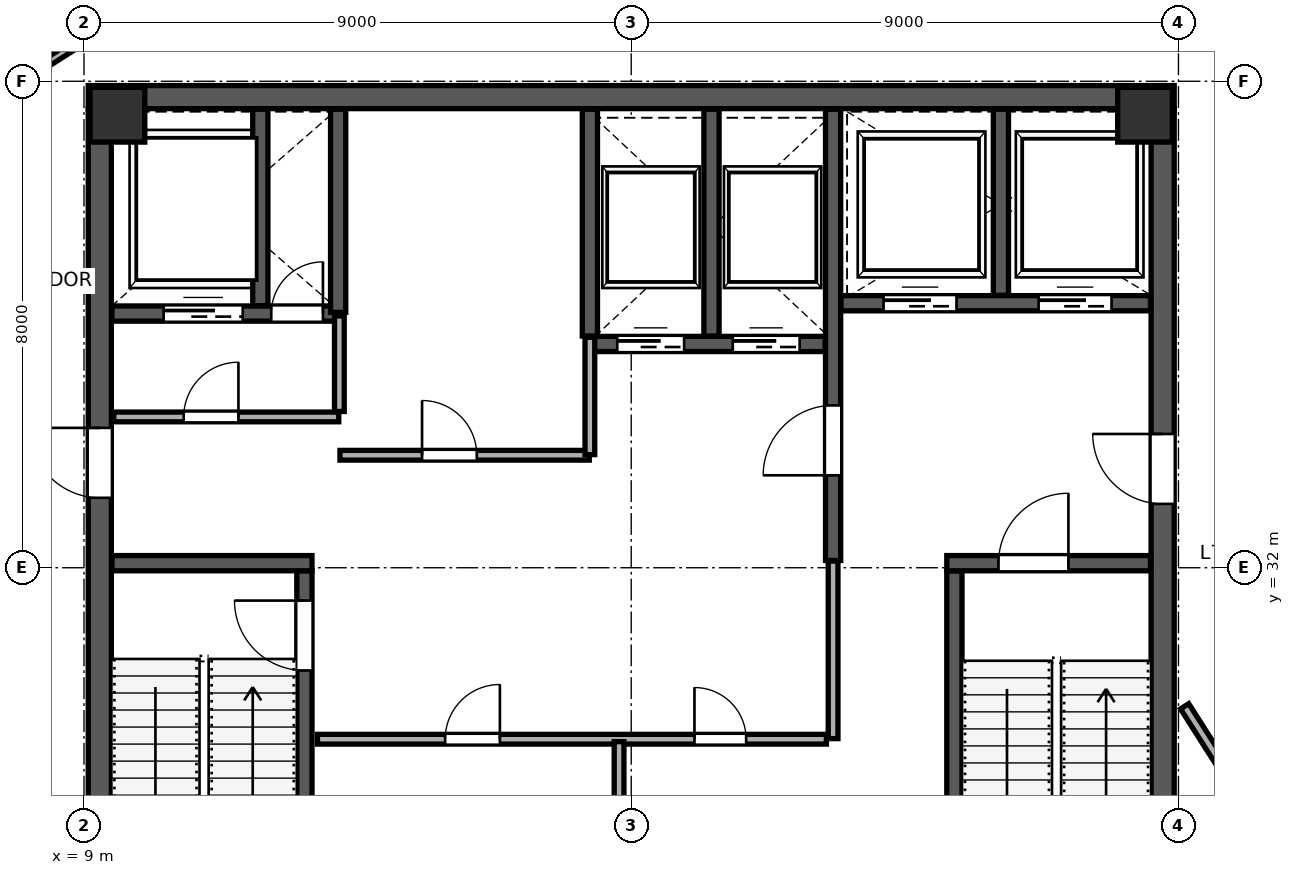
"""IFC4 building model, lengths in metres.
Left out: names, types, materials, properties, quantities, classifications, styles, units other than length and angle.
Written with IfcOpenShell. Run it as: python <this file> out.ifc"""

import sys

from ifc_helpers import new_model, si_unit, direction, frame, frame_2d, origin, origin_2d, place, context, subcontext, project, spatial, rectangle, extrude, source, transform, mapped, element, fill, save


model = new_model("IFC4")
c1 = context("Model", 3, precision=1e-05, world=origin(), true_north=direction((0.0, 1.0)))
c2 = subcontext(c1, "Body", "Model", "MODEL_VIEW")
j1 = project(units=[si_unit("LENGTHUNIT", "METRE"), si_unit("PLANEANGLEUNIT", "RADIAN")], contexts=[c1])
p1 = place(None, origin())
s1 = spatial("IfcSite", under=j1, at=p1, CompositionType="ELEMENT")
p2 = place(p1, origin())
s2 = spatial("IfcBuilding", under=s1, at=p2, CompositionType="ELEMENT")
p3 = place(p2, frame((0.0, 0.0, 311.4)))
s3 = spatial("IfcBuildingStorey", under=s2, at=p3, CompositionType="ELEMENT", Elevation=311.4)
m1 = source(origin(), c2, "Body", "SweptSolid", [
    extrude(rectangle(XDim=0.9, YDim=0.9, at=origin_2d()), origin(), (0.0, 0.0, 1.0), 4.199),
])
for number, where, z_axis, x_axis in (
    (1, (9.55, 39.45, 0.001), (0.0, 0.0, 1.0), (1.0, 0.0, 0.0)),
    (2, (26.45, 39.45, 0.001), (0.0, 0.0, 1.0), (1.0, 0.0, 0.0)),
):
    element("IfcColumn", number, at=place(p3, frame(where, z_axis=z_axis, x_axis=x_axis)), inside=s3, PredefinedType="COLUMN", context=c2, shape_type="MappedRepresentation", body=[
        mapped(m1, transform((0.0, 0.0, 0.0), scale=1.0)),
    ])
p4 = place(p3, frame((9.26, 24.45, 0.0), z_axis=(0.0, 0.0, 1.0), x_axis=(0.0, 1.0, 0.0)))
e3 = element("IfcWall", 3, at=p4, inside=s3, PredefinedType="SHEAR", context=c2, shape_type="SweptSolid", body=[
    extrude(rectangle(XDim=15.1, YDim=0.38, at=frame_2d((7.55, 0.0))), origin(), (0.0, 0.0, 1.0), 3.96),
])
p5 = place(p4, frame((8.7, 0.0, 0.0)))
e4 = element("IfcOpeningElement", 4, at=p5, cuts=e3, PredefinedType="OPENING", context=c2, shape_type="SweptSolid", body=[
    extrude(rectangle(XDim=1.15, YDim=2.2, at=frame_2d((0.575, 1.1))), frame((0.0, 0.2, 0.0), z_axis=(0.0, -1.0, 0.0), x_axis=(1.0, 0.0, 0.0)), (0.0, 0.0, 1.0), 0.4),
])
p6 = place(p3, frame((26.74, 24.45, 0.0), z_axis=(0.0, 0.0, 1.0), x_axis=(0.0, 1.0, 0.0)))
e5 = element("IfcWall", 5, at=p6, inside=s3, PredefinedType="SHEAR", context=c2, shape_type="SweptSolid", body=[
    extrude(rectangle(XDim=15.1, YDim=0.38, at=frame_2d((7.55, 0.0))), origin(), (0.0, 0.0, 1.0), 3.96),
])
p7 = place(p6, frame((8.6, 0.0, 0.0)))
e6 = element("IfcOpeningElement", 6, at=p7, cuts=e5, PredefinedType="OPENING", context=c2, shape_type="SweptSolid", body=[
    extrude(rectangle(XDim=1.15, YDim=2.2, at=frame_2d((0.575, 1.1))), frame((0.0, 0.2, 0.0), z_axis=(0.0, -1.0, 0.0), x_axis=(1.0, 0.0, 0.0)), (0.0, 0.0, 1.0), 0.4),
])
p8 = place(p3, frame((9.07, 39.74, 0.0), z_axis=(0.0, 0.0, 1.0), x_axis=(1.0, 0.0, 0.0)))
e7 = element("IfcWall", 7, at=p8, inside=s3, PredefinedType="SHEAR", context=c2, shape_type="SweptSolid", body=[
    extrude(rectangle(XDim=17.86, YDim=0.38, at=frame_2d((8.93, 0.0))), origin(), (0.0, 0.0, 1.0), 3.96),
])
p9 = place(p3, frame((12.625, 24.46, 0.0), z_axis=(0.0, 0.0, 1.0), x_axis=(0.0, 1.0, 0.0)))
e8 = element("IfcWall", 8, at=p9, inside=s3, PredefinedType="SHEAR", context=c2, shape_type="SweptSolid", body=[
    extrude(rectangle(XDim=7.49, YDim=0.25, at=frame_2d((3.745, 0.0))), origin(), (0.0, 0.0, 1.0), 3.96),
])
p10 = place(p9, frame((5.85, 0.0, 0.0)))
e9 = element("IfcOpeningElement", 9, at=p10, cuts=e8, PredefinedType="OPENING", context=c2, shape_type="SweptSolid", body=[
    extrude(rectangle(XDim=1.15, YDim=2.2, at=frame_2d((0.575, 1.1))), frame((0.0, 0.135, 0.0), z_axis=(0.0, -1.0, 0.0), x_axis=(1.0, 0.0, 0.0)), (0.0, 0.0, 1.0), 0.27),
])
p11 = place(p3, frame((9.46, 32.075, 0.0), z_axis=(0.0, 0.0, 1.0), x_axis=(1.0, 0.0, 0.0)))
e10 = element("IfcWall", 10, at=p11, inside=s3, PredefinedType="SHEAR", context=c2, shape_type="SweptSolid", body=[
    extrude(rectangle(XDim=3.29, YDim=0.25, at=frame_2d((1.645, 0.0))), origin(), (0.0, 0.0, 1.0), 3.96),
])
p12 = place(p3, frame((23.315, 24.46, 0.0), z_axis=(0.0, 0.0, 1.0), x_axis=(0.0, 1.0, 0.0)))
e11 = element("IfcWall", 11, at=p12, inside=s3, PredefinedType="SHEAR", context=c2, shape_type="SweptSolid", body=[
    extrude(rectangle(XDim=7.49, YDim=0.25, at=frame_2d((3.745, 0.0))), origin(), (0.0, 0.0, 1.0), 3.96),
])
p13 = place(p3, frame((23.19, 32.075, 0.0), z_axis=(0.0, 0.0, 1.0), x_axis=(1.0, 0.0, 0.0)))
e12 = element("IfcWall", 12, at=p13, inside=s3, PredefinedType="SHEAR", context=c2, shape_type="SweptSolid", body=[
    extrude(rectangle(XDim=3.35, YDim=0.25, at=frame_2d((1.675, 0.0))), origin(), (0.0, 0.0, 1.0), 3.96),
])
p14 = place(p13, frame((0.85, 0.0, 0.0)))
e13 = element("IfcOpeningElement", 13, at=p14, cuts=e12, PredefinedType="OPENING", context=c2, shape_type="SweptSolid", body=[
    extrude(rectangle(XDim=1.15, YDim=2.2, at=frame_2d((0.575, 1.1))), frame((0.0, 0.135, 0.0), z_axis=(0.0, -1.0, 0.0), x_axis=(1.0, 0.0, 0.0)), (0.0, 0.0, 1.0), 0.27),
])
p15 = place(p3, frame((21.32, 32.12, 0.0), z_axis=(0.0, 0.0, 1.0), x_axis=(0.0, 1.0, 0.0)))
e14 = element("IfcWall", 14, at=p15, inside=s3, PredefinedType="SHEAR", context=c2, shape_type="SweptSolid", body=[
    extrude(rectangle(XDim=7.42, YDim=0.25, at=frame_2d((3.71, 0.0))), origin(), (0.0, 0.0, 1.0), 3.96),
])
p16 = place(p15, frame((1.4, 0.0, 0.0)))
e15 = element("IfcOpeningElement", 15, at=p16, cuts=e14, PredefinedType="OPENING", context=c2, shape_type="SweptSolid", body=[
    extrude(rectangle(XDim=1.15, YDim=2.2, at=frame_2d((0.575, 1.1))), frame((0.0, 0.135, 0.0), z_axis=(0.0, -1.0, 0.0), x_axis=(1.0, 0.0, 0.0)), (0.0, 0.0, 1.0), 0.27),
])
p17 = place(p3, frame((9.46, 36.18, 0.0), z_axis=(0.0, 0.0, 1.0), x_axis=(1.0, 0.0, 0.0)))
e16 = element("IfcWall", 16, at=p17, inside=s3, PredefinedType="SHEAR", context=c2, shape_type="SweptSolid", body=[
    extrude(rectangle(XDim=3.79, YDim=0.25, at=frame_2d((1.895, 0.0))), origin(), (0.0, 0.0, 1.0), 3.96),
])
p18 = place(p17, frame((2.62, 0.0, 0.0)))
e17 = element("IfcOpeningElement", 17, at=p18, cuts=e16, PredefinedType="OPENING", context=c2, shape_type="SweptSolid", body=[
    extrude(rectangle(XDim=0.85, YDim=2.1, at=frame_2d((0.425, 1.05))), frame((0.0, 0.135, 0.0), z_axis=(0.0, -1.0, 0.0), x_axis=(1.0, 0.0, 0.0)), (0.0, 0.0, 1.0), 0.27),
])
p19 = place(p17, frame((0.85, 0.0, 0.0)))
e18 = element("IfcOpeningElement", 18, at=p19, cuts=e16, PredefinedType="OPENING", context=c2, shape_type="SweptSolid", body=[
    extrude(rectangle(XDim=1.3, YDim=2.25, at=frame_2d((0.65, 1.125))), frame((0.0, 0.135, 0.0), z_axis=(0.0, -1.0, 0.0), x_axis=(1.0, 0.0, 0.0)), (0.0, 0.0, 1.0), 0.27),
])
p20 = place(p3, frame((11.9, 36.31, 0.0), z_axis=(0.0, 0.0, 1.0), x_axis=(0.0, 1.0, 0.0)))
e19 = element("IfcWall", 19, at=p20, inside=s3, PredefinedType="SHEAR", context=c2, shape_type="SweptSolid", body=[
    extrude(rectangle(XDim=3.23, YDim=0.25, at=frame_2d((1.615, 0.0))), origin(), (0.0, 0.0, 1.0), 3.96),
])
p21 = place(p3, frame((21.45, 36.35, 0.0), z_axis=(0.0, 0.0, 1.0), x_axis=(1.0, 0.0, 0.0)))
e20 = element("IfcWall", 20, at=p21, inside=s3, PredefinedType="SHEAR", context=c2, shape_type="SweptSolid", body=[
    extrude(rectangle(XDim=5.09, YDim=0.25, at=frame_2d((2.545, 0.0))), origin(), (0.0, 0.0, 1.0), 3.96),
])
p22 = place(p21, frame((0.7, 0.0, 0.0)))
e21 = element("IfcOpeningElement", 21, at=p22, cuts=e20, PredefinedType="OPENING", context=c2, shape_type="SweptSolid", body=[
    extrude(rectangle(XDim=1.2, YDim=2.2, at=frame_2d((0.6, 1.1))), frame((0.0, 0.135, 0.0), z_axis=(0.0, -1.0, 0.0), x_axis=(1.0, 0.0, 0.0)), (0.0, 0.0, 1.0), 0.27),
])
p23 = place(p21, frame((3.25, 0.0, 0.0)))
e22 = element("IfcOpeningElement", 22, at=p23, cuts=e20, PredefinedType="OPENING", context=c2, shape_type="SweptSolid", body=[
    extrude(rectangle(XDim=1.2, YDim=2.2, at=frame_2d((0.6, 1.1))), frame((0.0, 0.135, 0.0), z_axis=(0.0, -1.0, 0.0), x_axis=(1.0, 0.0, 0.0)), (0.0, 0.0, 1.0), 0.27),
])
p24 = place(p3, frame((24.08, 36.48, 0.0), z_axis=(0.0, 0.0, 1.0), x_axis=(0.0, 1.0, 0.0)))
e23 = element("IfcWall", 23, at=p24, inside=s3, PredefinedType="SHEAR", context=c2, shape_type="SweptSolid", body=[
    extrude(rectangle(XDim=3.06, YDim=0.25, at=frame_2d((1.53, 0.0))), origin(), (0.0, 0.0, 1.0), 3.96),
])
p25 = place(p3, frame((13.18, 36.2, 0.0), z_axis=(0.0, 0.0, 1.0), x_axis=(0.0, 1.0, 0.0)))
e24 = element("IfcWall", 24, at=p25, inside=s3, PredefinedType="SHEAR", context=c2, shape_type="SweptSolid", body=[
    extrude(rectangle(XDim=3.34, YDim=0.25, at=frame_2d((1.67, 0.0))), origin(), (0.0, 0.0, 1.0), 3.96),
])
p26 = place(p3, frame((17.32, 35.68, 0.0), z_axis=(0.0, 0.0, 1.0), x_axis=(1.0, 0.0, 0.0)))
e25 = element("IfcWall", 25, at=p26, inside=s3, PredefinedType="SHEAR", context=c2, shape_type="SweptSolid", body=[
    extrude(rectangle(XDim=3.87, YDim=0.25, at=frame_2d((1.935, 0.0))), origin(), (0.0, 0.0, 1.0), 3.96),
])
p27 = place(p26, frame((0.45, 0.0, 0.0)))
e26 = element("IfcOpeningElement", 26, at=p27, cuts=e25, PredefinedType="OPENING", context=c2, shape_type="SweptSolid", body=[
    extrude(rectangle(XDim=1.1, YDim=2.2, at=frame_2d((0.55, 1.1))), frame((0.0, 0.135, 0.0), z_axis=(0.0, -1.0, 0.0), x_axis=(1.0, 0.0, 0.0)), (0.0, 0.0, 1.0), 0.27),
])
p28 = place(p26, frame((2.35, 0.0, 0.0)))
e27 = element("IfcOpeningElement", 27, at=p28, cuts=e25, PredefinedType="OPENING", context=c2, shape_type="SweptSolid", body=[
    extrude(rectangle(XDim=1.1, YDim=2.2, at=frame_2d((0.55, 1.1))), frame((0.0, 0.135, 0.0), z_axis=(0.0, -1.0, 0.0), x_axis=(1.0, 0.0, 0.0)), (0.0, 0.0, 1.0), 0.27),
])
for number, where, z_axis, x_axis in (
    (28, (17.32, 35.81, 0.0), (0.0, 0.0, 1.0), (0.0, 1.0, 0.0)),
    (29, (19.32, 35.81, 0.0), (0.0, 0.0, 1.0), (0.0, 1.0, 0.0)),
):
    element("IfcWall", number, at=place(p3, frame(where, z_axis=z_axis, x_axis=x_axis)), inside=s3, PredefinedType="SHEAR", context=c2, shape_type="SweptSolid", body=[
        extrude(rectangle(XDim=3.73, YDim=0.25, at=frame_2d((1.865, 0.0))), origin(), (0.0, 0.0, 1.0), 3.96),
    ])
p29 = place(p3, frame((9.49, 34.48, 0.0), z_axis=(0.0, 0.0, 1.0), x_axis=(1.0, 0.0, 0.0)))
e30 = element("IfcWall", 30, at=p29, inside=s3, PredefinedType="PARTITIONING", context=c2, shape_type="SweptSolid", body=[
    extrude(rectangle(XDim=3.7, YDim=0.16, at=frame_2d((1.85, 0.0))), origin(), (0.0, 0.0, 1.0), 3.96),
])
p30 = place(p29, frame((1.15, 0.0, 0.0)))
e31 = element("IfcOpeningElement", 31, at=p30, cuts=e30, PredefinedType="OPENING", context=c2, shape_type="SweptSolid", body=[
    extrude(rectangle(XDim=0.9, YDim=2.15, at=frame_2d((0.45, 1.075))), frame((0.0, 0.09, 0.0), z_axis=(0.0, -1.0, 0.0), x_axis=(1.0, 0.0, 0.0)), (0.0, 0.0, 1.0), 0.18),
])
p31 = place(p3, frame((13.2, 34.57, 0.0), z_axis=(0.0, 0.0, 1.0), x_axis=(0.0, 1.0, 0.0)))
e32 = element("IfcWall", 32, at=p31, inside=s3, PredefinedType="PARTITIONING", context=c2, shape_type="SweptSolid", body=[
    extrude(rectangle(XDim=1.57, YDim=0.16, at=frame_2d((0.785, 0.0))), origin(), (0.0, 0.0, 1.0), 3.96),
])
p32 = place(p3, frame((13.21, 33.85, 0.0), z_axis=(0.0, 0.0, 1.0), x_axis=(1.0, 0.0, 0.0)))
e33 = element("IfcWall", 33, at=p32, inside=s3, PredefinedType="PARTITIONING", context=c2, shape_type="SweptSolid", body=[
    extrude(rectangle(XDim=4.1, YDim=0.16, at=frame_2d((2.05, 0.0))), origin(), (0.0, 0.0, 1.0), 3.96),
])
p33 = place(p32, frame((1.35, 0.0, 0.0)))
e34 = element("IfcOpeningElement", 34, at=p33, cuts=e33, PredefinedType="OPENING", context=c2, shape_type="SweptSolid", body=[
    extrude(rectangle(XDim=0.9, YDim=2.15, at=frame_2d((0.45, 1.075))), frame((0.0, 0.09, 0.0), z_axis=(0.0, -1.0, 0.0), x_axis=(1.0, 0.0, 0.0)), (0.0, 0.0, 1.0), 0.18),
])
p34 = place(p3, frame((17.32, 33.86, 0.0), z_axis=(0.0, 0.0, 1.0), x_axis=(0.0, 1.0, 0.0)))
e35 = element("IfcWall", 35, at=p34, inside=s3, PredefinedType="PARTITIONING", context=c2, shape_type="SweptSolid", body=[
    extrude(rectangle(XDim=1.93, YDim=0.16, at=frame_2d((0.965, 0.0))), origin(), (0.0, 0.0, 1.0), 3.96),
])
p35 = place(p3, frame((12.84, 29.18, 0.0), z_axis=(0.0, 0.0, 1.0), x_axis=(1.0, 0.0, 0.0)))
e36 = element("IfcWall", 36, at=p35, inside=s3, PredefinedType="PARTITIONING", context=c2, shape_type="SweptSolid", body=[
    extrude(rectangle(XDim=8.37, YDim=0.16, at=frame_2d((4.185, 0.0))), origin(), (0.0, 0.0, 1.0), 3.96),
])
p36 = place(p35, frame((2.1, 0.0, 0.0)))
e37 = element("IfcOpeningElement", 37, at=p36, cuts=e36, PredefinedType="OPENING", context=c2, shape_type="SweptSolid", body=[
    extrude(rectangle(XDim=0.9, YDim=2.15, at=frame_2d((0.45, 1.075))), frame((0.0, 0.09, 0.0), z_axis=(0.0, -1.0, 0.0), x_axis=(1.0, 0.0, 0.0)), (0.0, 0.0, 1.0), 0.18),
])
p37 = place(p35, frame((6.2, 0.0, 0.0)))
e38 = element("IfcOpeningElement", 38, at=p37, cuts=e36, PredefinedType="OPENING", context=c2, shape_type="SweptSolid", body=[
    extrude(rectangle(XDim=0.85, YDim=2.1, at=frame_2d((0.425, 1.05))), frame((0.0, 0.09, 0.0), z_axis=(0.0, -1.0, 0.0), x_axis=(1.0, 0.0, 0.0)), (0.0, 0.0, 1.0), 0.18),
])
p38 = place(p3, frame((17.8, 24.54, 0.0), z_axis=(0.0, 0.0, 1.0), x_axis=(0.0, 1.0, 0.0)))
e39 = element("IfcWall", 39, at=p38, inside=s3, PredefinedType="PARTITIONING", context=c2, shape_type="SweptSolid", body=[
    extrude(rectangle(XDim=4.6, YDim=0.16, at=frame_2d((2.3, 0.0))), origin(), (0.0, 0.0, 1.0), 3.96),
])
p39 = place(p3, frame((21.32, 29.19, 0.0), z_axis=(0.0, 0.0, 1.0), x_axis=(0.0, 1.0, 0.0)))
e40 = element("IfcWall", 40, at=p39, inside=s3, PredefinedType="PARTITIONING", context=c2, shape_type="SweptSolid", body=[
    extrude(rectangle(XDim=2.92, YDim=0.16, at=frame_2d((1.46, 0.0))), origin(), (0.0, 0.0, 1.0), 3.96),
])
p40 = place(p3, frame((3.26, 30.945, 0.0), z_axis=(0.0, 0.0, 1.0), x_axis=(0.537307625317, -0.843386338386, 0.0)))
e41 = element("IfcWall", 41, at=p40, inside=s3, PredefinedType="PARTITIONING", context=c2, shape_type="SweptSolid", body=[
    extrude(rectangle(XDim=13.67, YDim=0.16, at=frame_2d((6.835, 0.0))), origin(), (0.0, 0.0, 1.0), 3.96),
])
p41 = place(p40, frame((1.15, 0.0, 0.0)))
e42 = element("IfcOpeningElement", 42, at=p41, cuts=e41, PredefinedType="OPENING", context=c2, shape_type="SweptSolid", body=[
    extrude(rectangle(XDim=0.95, YDim=2.15, at=frame_2d((0.475, 1.075))), frame((0.0, 0.09, 0.0), z_axis=(0.0, -1.0, 0.0), x_axis=(1.0, 0.0, 0.0)), (0.0, 0.0, 1.0), 0.18),
])
p42 = place(p3, frame((27.102, 29.721, 0.0), z_axis=(0.0, 0.0, 1.0), x_axis=(0.537279676557, -0.843404143432, 0.0)))
e43 = element("IfcWall", 43, at=p42, inside=s3, PredefinedType="PARTITIONING", context=c2, shape_type="SweptSolid", body=[
    extrude(rectangle(XDim=1.329, YDim=0.16, at=frame_2d((0.664, 0.0))), origin(), (0.0, 0.0, 1.0), 3.96),
])
p43 = place(p3, frame((22.509, 49.847, 0.0), z_axis=(0.0, 0.0, 1.0), x_axis=(0.537290700932, -0.843397120396, 0.0)))
e44 = element("IfcWall", 44, at=p43, inside=s3, PredefinedType="PARTITIONING", context=c2, shape_type="SweptSolid", body=[
    extrude(rectangle(XDim=20.77, YDim=0.135, at=frame_2d((10.385, 0.0))), origin(), (0.0, 0.0, 1.0), 3.96),
])
p44 = place(p43, frame((4.3, 0.0, 0.0)))
e45 = element("IfcOpeningElement", 45, at=p44, cuts=e44, PredefinedType="OPENING", context=c2, shape_type="SweptSolid", body=[
    extrude(rectangle(XDim=0.95, YDim=2.15, at=frame_2d((0.475, 1.075))), frame((0.0, 0.078, 0.0), z_axis=(0.0, -1.0, 0.0), x_axis=(1.0, 0.0, 0.0)), (0.0, 0.0, 1.0), 0.155),
])
p45 = place(p3, frame((1.798, 36.107, 0.0), z_axis=(0.0, 0.0, 1.0), x_axis=(0.843396745572, 0.537291289301, 0.0)))
e46 = element("IfcWall", 46, at=p45, inside=s3, PredefinedType="PARTITIONING", context=c2, shape_type="SweptSolid", body=[
    extrude(rectangle(XDim=17.17, YDim=0.135, at=frame_2d((8.585, 0.0))), origin(), (0.0, 0.0, 1.0), 3.96),
])
m2 = source(origin(), c2, "Body", "SweptSolid", [
    extrude(rectangle(XDim=1.15, YDim=2.2, at=frame_2d((0.575, 1.1))), frame((0.0, 0.025, 0.0), z_axis=(0.0, -1.0, 0.0), x_axis=(1.0, 0.0, 0.0)), (0.0, 0.0, 1.0), 0.05),
])
p46 = place(p10, origin())
e47 = element("IfcDoor", 47, at=p46, inside=s3, OperationType="SINGLE_SWING_RIGHT", PredefinedType="DOOR", context=c2, shape_type="MappedRepresentation", body=[
    mapped(m2, transform((0.0, 0.0, 0.0), scale=1.0)),
])
fill(e9, e47)
m3 = source(origin(), c2, "Body", "SweptSolid", [
    extrude(rectangle(XDim=1.15, YDim=2.2, at=frame_2d((0.575, 1.1))), frame((0.0, 0.025, 0.0), z_axis=(0.0, -1.0, 0.0), x_axis=(1.0, 0.0, 0.0)), (0.0, 0.0, 1.0), 0.05),
])
p47 = place(p16, origin())
e48 = element("IfcDoor", 48, at=p47, inside=s3, OperationType="SINGLE_SWING_LEFT", PredefinedType="DOOR", context=c2, shape_type="MappedRepresentation", body=[
    mapped(m3, transform((0.0, 0.0, 0.0), scale=1.0)),
])
fill(e15, e48)
p48 = place(p14, origin())
e49 = element("IfcDoor", 49, at=p48, inside=s3, OperationType="SINGLE_SWING_RIGHT", PredefinedType="DOOR", context=c2, shape_type="MappedRepresentation", body=[
    mapped(m2, transform((0.0, 0.0, 0.0), scale=1.0)),
])
fill(e13, e49)
p49 = place(p7, origin())
e50 = element("IfcDoor", 50, at=p49, inside=s3, OperationType="SINGLE_SWING_RIGHT", PredefinedType="DOOR", context=c2, shape_type="MappedRepresentation", body=[
    mapped(m3, transform((0.0, 0.0, 0.0), scale=1.0)),
])
fill(e6, e50)
p50 = place(p5, origin())
e51 = element("IfcDoor", 51, at=p50, inside=s3, OperationType="SINGLE_SWING_RIGHT", PredefinedType="DOOR", context=c2, shape_type="MappedRepresentation", body=[
    mapped(m3, transform((0.0, 0.0, 0.0), scale=1.0)),
])
fill(e4, e51)
m4 = source(origin(), c2, "Body", "SweptSolid", [
    extrude(rectangle(XDim=0.85, YDim=2.1, at=frame_2d((0.425, 1.05))), frame((0.0, 0.025, 0.0), z_axis=(0.0, -1.0, 0.0), x_axis=(1.0, 0.0, 0.0)), (0.0, 0.0, 1.0), 0.05),
])
p51 = place(p18, origin())
e52 = element("IfcDoor", 52, at=p51, inside=s3, OperationType="SINGLE_SWING_RIGHT", PredefinedType="DOOR", context=c2, shape_type="MappedRepresentation", body=[
    mapped(m4, transform((0.0, 0.0, 0.0), scale=1.0)),
])
fill(e17, e52)
m5 = source(origin(), c2, "Body", "SweptSolid", [
    extrude(rectangle(XDim=1.1, YDim=2.2, at=frame_2d((0.55, 1.1))), frame((0.0, 0.025, 0.0), z_axis=(0.0, -1.0, 0.0), x_axis=(1.0, 0.0, 0.0)), (0.0, 0.0, 1.0), 0.05),
])
p52 = place(p27, origin())
e53 = element("IfcDoor", 53, at=p52, inside=s3, OperationType="SLIDING_TO_LEFT", PredefinedType="DOOR", context=c2, shape_type="MappedRepresentation", body=[
    mapped(m5, transform((0.0, 0.0, 0.0), scale=1.0)),
])
fill(e26, e53)
p53 = place(p28, origin())
e54 = element("IfcDoor", 54, at=p53, inside=s3, OperationType="SLIDING_TO_RIGHT", PredefinedType="DOOR", context=c2, shape_type="MappedRepresentation", body=[
    mapped(m5, transform((0.0, 0.0, 0.0), scale=1.0)),
])
fill(e27, e54)
m6 = source(origin(), c2, "Body", "SweptSolid", [
    extrude(rectangle(XDim=1.2, YDim=2.2, at=frame_2d((0.6, 1.1))), frame((0.0, 0.025, 0.0), z_axis=(0.0, -1.0, 0.0), x_axis=(1.0, 0.0, 0.0)), (0.0, 0.0, 1.0), 0.05),
])
p54 = place(p22, origin())
e55 = element("IfcDoor", 55, at=p54, inside=s3, OperationType="SLIDING_TO_LEFT", PredefinedType="DOOR", context=c2, shape_type="MappedRepresentation", body=[
    mapped(m6, transform((0.0, 0.0, 0.0), scale=1.0)),
])
fill(e21, e55)
p55 = place(p23, origin())
e56 = element("IfcDoor", 56, at=p55, inside=s3, OperationType="SLIDING_TO_RIGHT", PredefinedType="DOOR", context=c2, shape_type="MappedRepresentation", body=[
    mapped(m6, transform((0.0, 0.0, 0.0), scale=1.0)),
])
fill(e22, e56)
m7 = source(origin(), c2, "Body", "SweptSolid", [
    extrude(rectangle(XDim=1.3, YDim=2.25, at=frame_2d((0.65, 1.125))), frame((0.0, 0.025, 0.0), z_axis=(0.0, -1.0, 0.0), x_axis=(1.0, 0.0, 0.0)), (0.0, 0.0, 1.0), 0.05),
])
p56 = place(p19, origin())
e57 = element("IfcDoor", 57, at=p56, inside=s3, OperationType="SLIDING_TO_LEFT", PredefinedType="DOOR", context=c2, shape_type="MappedRepresentation", body=[
    mapped(m7, transform((0.0, 0.0, 0.0), scale=1.0)),
])
fill(e18, e57)
m8 = source(origin(), c2, "Body", "SweptSolid", [
    extrude(rectangle(XDim=0.9, YDim=2.15, at=frame_2d((0.45, 1.075))), frame((0.0, 0.025, 0.0), z_axis=(0.0, -1.0, 0.0), x_axis=(1.0, 0.0, 0.0)), (0.0, 0.0, 1.0), 0.05),
])
p57 = place(p30, origin())
e58 = element("IfcDoor", 58, at=p57, inside=s3, OperationType="SINGLE_SWING_RIGHT", PredefinedType="DOOR", context=c2, shape_type="MappedRepresentation", body=[
    mapped(m8, transform((0.0, 0.0, 0.0), scale=1.0)),
])
fill(e31, e58)
p58 = place(p33, origin())
e59 = element("IfcDoor", 59, at=p58, inside=s3, OperationType="SINGLE_SWING_LEFT", PredefinedType="DOOR", context=c2, shape_type="MappedRepresentation", body=[
    mapped(m8, transform((0.0, 0.0, 0.0), scale=1.0)),
])
fill(e34, e59)
p59 = place(p36, origin())
e60 = element("IfcDoor", 60, at=p59, inside=s3, OperationType="SINGLE_SWING_RIGHT", PredefinedType="DOOR", context=c2, shape_type="MappedRepresentation", body=[
    mapped(m8, transform((0.0, 0.0, 0.0), scale=1.0)),
])
fill(e37, e60)
p60 = place(p37, origin())
e61 = element("IfcDoor", 61, at=p60, inside=s3, OperationType="SINGLE_SWING_LEFT", PredefinedType="DOOR", context=c2, shape_type="MappedRepresentation", body=[
    mapped(m4, transform((0.0, 0.0, 0.0), scale=1.0)),
])
fill(e38, e61)
save(model, sys.argv[1])
